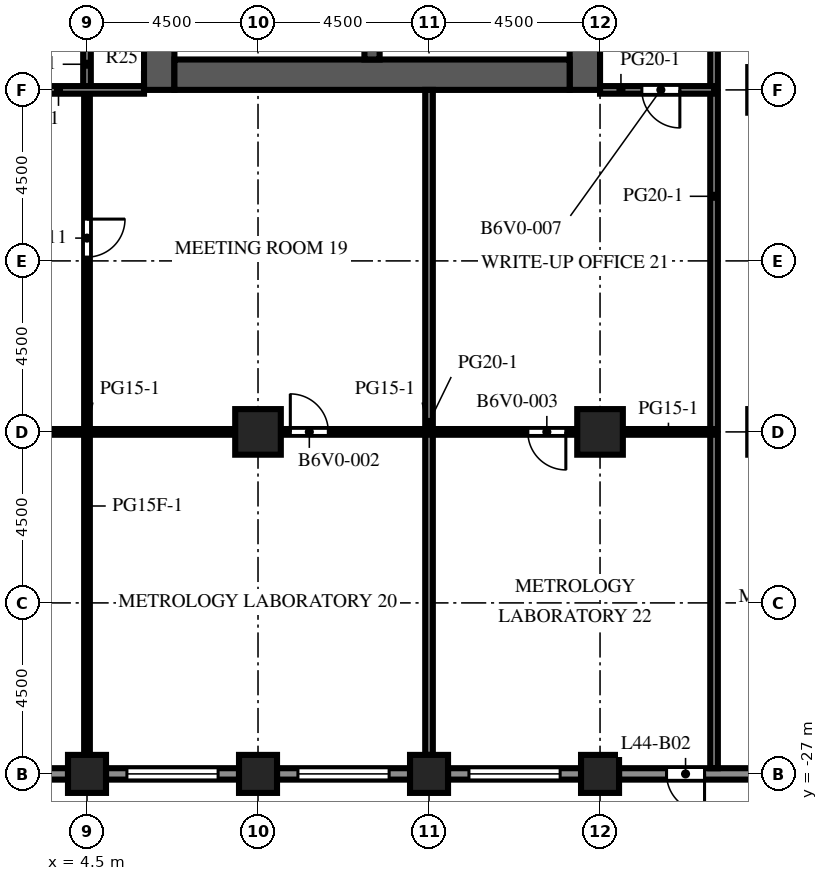
"""IFC4 building model, lengths in metres.
Left out: names, types, materials, properties, quantities, classifications, styles, units other than length and angle.
Written with IfcOpenShell. Run it as: python <this file> out.ifc"""

import sys

from ifc_helpers import new_model, si_unit, direction, frame, frame_2d, origin, origin_2d, place, context, subcontext, project, spatial, rectangle, extrude, element, fill, save


model = new_model("IFC4")
c1 = context("Model", 3, precision=1e-05, world=origin(), true_north=direction((0.0, 1.0)))
c2 = subcontext(c1, "Body", "Model", "MODEL_VIEW")
j1 = project(units=[si_unit("LENGTHUNIT", "METRE"), si_unit("PLANEANGLEUNIT", "RADIAN")], contexts=[c1])
p1 = place(None, origin())
s1 = spatial("IfcSite", under=j1, at=p1, CompositionType="ELEMENT")
p2 = place(p1, origin())
s2 = spatial("IfcBuilding", under=s1, at=p2, CompositionType="ELEMENT")
p3 = place(p2, frame((0.0, 0.0, 195.6)))
s3 = spatial("IfcBuildingStorey", under=s2, at=p3, CompositionType="ELEMENT", Elevation=195.6)
for number, where, z_axis, x_axis in (
    (1, (4.5, -27.0, 0.0), (0.0, 0.0, 1.0), (1.0, 0.0, 0.0)),
    (2, (9.0, -27.0, 0.0), (0.0, 0.0, 1.0), (1.0, 0.0, 0.0)),
    (3, (13.5, -27.0, 0.0), (0.0, 0.0, 1.0), (1.0, 0.0, 0.0)),
    (4, (18.0, -27.0, 0.0), (0.0, 0.0, 1.0), (1.0, 0.0, 0.0)),
):
    element("IfcColumn", number, at=place(p3, frame(where, z_axis=z_axis, x_axis=x_axis)), inside=s3, PredefinedType="COLUMN", context=c2, shape_type="SweptSolid", body=[
        extrude(rectangle(XDim=1.0, YDim=1.0, at=origin_2d()), origin(), (0.0, 0.0, 1.0), 4.1),
    ])
for number, where, z_axis, x_axis in (
    (5, (9.0, -18.0, 0.0), (0.0, 0.0, 1.0), (1.0, 0.0, 0.0)),
    (6, (18.0, -18.0, 0.0), (0.0, 0.0, 1.0), (1.0, 0.0, 0.0)),
):
    element("IfcColumn", number, at=place(p3, frame(where, z_axis=z_axis, x_axis=x_axis)), inside=s3, PredefinedType="COLUMN", context=c2, shape_type="SweptSolid", body=[
        extrude(rectangle(XDim=1.2, YDim=1.2, at=origin_2d()), origin(), (0.0, 0.0, 1.0), 4.1),
    ])
p4 = place(p3, frame((6.4, -9.0, 0.0), z_axis=(0.0, 0.0, 1.0), x_axis=(0.0, 1.0, 0.0)))
e7 = element("IfcWall", 7, at=p4, inside=s3, PredefinedType="SHEAR", context=c2, shape_type="SweptSolid", body=[
    extrude(rectangle(XDim=27.5, YDim=0.8, at=frame_2d((13.75, 0.0))), origin(), (0.0, 0.0, 1.0), 4.1),
])
p5 = place(p4, frame((12.55, 0.0, 0.0)))
e8 = element("IfcOpeningElement", 8, at=p5, cuts=e7, PredefinedType="OPENING", context=c2, shape_type="SweptSolid", body=[
    extrude(rectangle(XDim=2.4, YDim=2.4, at=frame_2d((1.2, 1.2))), frame((0.0, 0.41, 0.0), z_axis=(0.0, -1.0, 0.0), x_axis=(1.0, 0.0, 0.0)), (0.0, 0.0, 1.0), 0.82),
])
p6 = place(p4, frame((3.95, 0.0, 0.0)))
e9 = element("IfcOpeningElement", 9, at=p6, cuts=e7, PredefinedType="OPENING", context=c2, shape_type="SweptSolid", body=[
    extrude(rectangle(XDim=1.2, YDim=2.1, at=frame_2d((0.6, 1.05))), frame((0.0, 0.41, 0.0), z_axis=(0.0, -1.0, 0.0), x_axis=(1.0, 0.0, 0.0)), (0.0, 0.0, 1.0), 0.82),
])
p7 = place(p4, frame((19.45, 0.0, 0.0)))
e10 = element("IfcOpeningElement", 10, at=p7, cuts=e7, PredefinedType="OPENING", context=c2, shape_type="SweptSolid", body=[
    extrude(rectangle(XDim=1.0, YDim=2.1, at=frame_2d((0.5, 1.05))), frame((0.0, 0.41, 0.0), z_axis=(0.0, -1.0, 0.0), x_axis=(1.0, 0.0, 0.0)), (0.0, 0.0, 1.0), 0.82),
])
p8 = place(p4, frame((21.137, 0.0, 0.0)))
e11 = element("IfcOpeningElement", 11, at=p8, cuts=e7, PredefinedType="OPENING", context=c2, shape_type="SweptSolid", body=[
    extrude(rectangle(XDim=1.0, YDim=2.1, at=frame_2d((0.5, 1.05))), frame((0.0, 0.41, 0.0), z_axis=(0.0, -1.0, 0.0), x_axis=(1.0, 0.0, 0.0)), (0.0, 0.0, 1.0), 0.82),
])
p9 = place(p4, frame((23.2, 0.0, 0.0)))
e12 = element("IfcOpeningElement", 12, at=p9, cuts=e7, PredefinedType="OPENING", context=c2, shape_type="SweptSolid", body=[
    extrude(rectangle(XDim=1.0, YDim=2.1, at=frame_2d((0.5, 1.05))), frame((0.0, 0.41, 0.0), z_axis=(0.0, -1.0, 0.0), x_axis=(1.0, 0.0, 0.0)), (0.0, 0.0, 1.0), 0.82),
])
p10 = place(p4, frame((25.262, 0.0, 0.0)))
e13 = element("IfcOpeningElement", 13, at=p10, cuts=e7, PredefinedType="OPENING", context=c2, shape_type="SweptSolid", body=[
    extrude(rectangle(XDim=1.0, YDim=2.1, at=frame_2d((0.5, 1.05))), frame((0.0, 0.41, 0.0), z_axis=(0.0, -1.0, 0.0), x_axis=(1.0, 0.0, 0.0)), (0.0, 0.0, 1.0), 0.82),
])
p11 = place(p3, frame((17.6, -9.0, 0.0), z_axis=(0.0, 0.0, 1.0), x_axis=(0.0, 1.0, 0.0)))
e14 = element("IfcWall", 14, at=p11, inside=s3, PredefinedType="SHEAR", context=c2, shape_type="SweptSolid", body=[
    extrude(rectangle(XDim=27.5, YDim=0.8, at=frame_2d((13.75, 0.0))), origin(), (0.0, 0.0, 1.0), 4.1),
])
p12 = place(p11, frame((12.55, 0.0, 0.0)))
e15 = element("IfcOpeningElement", 15, at=p12, cuts=e14, PredefinedType="OPENING", context=c2, shape_type="SweptSolid", body=[
    extrude(rectangle(XDim=2.4, YDim=2.4, at=frame_2d((1.2, 1.2))), frame((0.0, 0.41, 0.0), z_axis=(0.0, -1.0, 0.0), x_axis=(1.0, 0.0, 0.0)), (0.0, 0.0, 1.0), 0.82),
])
p13 = place(p11, frame((6.825, 0.0, 0.0)))
e16 = element("IfcOpeningElement", 16, at=p13, cuts=e14, PredefinedType="OPENING", context=c2, shape_type="SweptSolid", body=[
    extrude(rectangle(XDim=1.2, YDim=2.1, at=frame_2d((0.6, 1.05))), frame((0.0, 0.41, 0.0), z_axis=(0.0, -1.0, 0.0), x_axis=(1.0, 0.0, 0.0)), (0.0, 0.0, 1.0), 0.82),
])
p14 = place(p11, frame((19.475, 0.0, 0.0)))
e17 = element("IfcOpeningElement", 17, at=p14, cuts=e14, PredefinedType="OPENING", context=c2, shape_type="SweptSolid", body=[
    extrude(rectangle(XDim=1.2, YDim=2.1, at=frame_2d((0.6, 1.05))), frame((0.0, 0.41, 0.0), z_axis=(0.0, -1.0, 0.0), x_axis=(1.0, 0.0, 0.0)), (0.0, 0.0, 1.0), 0.82),
])
p15 = place(p3, frame((6.8, -8.6, 0.0), z_axis=(0.0, 0.0, 1.0), x_axis=(1.0, 0.0, 0.0)))
e18 = element("IfcWall", 18, at=p15, inside=s3, PredefinedType="SHEAR", context=c2, shape_type="SweptSolid", body=[
    extrude(rectangle(XDim=10.4, YDim=0.8, at=frame_2d((5.2, 0.0))), origin(), (0.0, 0.0, 1.0), 4.1),
])
p16 = place(p3, frame((12.0, -8.2, 0.0), z_axis=(0.0, 0.0, 1.0), x_axis=(0.0, 1.0, 0.0)))
e19 = element("IfcWall", 19, at=p16, inside=s3, PredefinedType="SHEAR", context=c2, shape_type="SweptSolid", body=[
    extrude(rectangle(XDim=7.5, YDim=0.4, at=frame_2d((3.75, 0.0))), origin(), (0.0, 0.0, 1.0), 4.1),
])
p17 = place(p3, frame((4.0, -27.0, 0.0), z_axis=(0.0, 0.0, 1.0), x_axis=(-1.0, 0.0, 0.0)))
e20 = element("IfcWall", 20, at=p17, inside=s3, PredefinedType="SOLIDWALL", context=c2, shape_type="SweptSolid", body=[
    extrude(rectangle(XDim=3.5, YDim=0.3, at=frame_2d((1.75, 0.0))), origin(), (0.0, 0.0, 1.0), 2.85),
])
p18 = place(p17, frame((0.55, 0.0, 0.8)))
e21 = element("IfcOpeningElement", 21, at=p18, cuts=e20, PredefinedType="OPENING", context=c2, shape_type="SweptSolid", body=[
    extrude(rectangle(XDim=2.4, YDim=1.7, at=frame_2d((1.2, 0.85))), frame((0.0, 0.16, 0.0), z_axis=(0.0, -1.0, 0.0), x_axis=(1.0, 0.0, 0.0)), (0.0, 0.0, 1.0), 0.32),
])
p19 = place(p3, frame((8.5, -27.0, 0.0), z_axis=(0.0, 0.0, 1.0), x_axis=(-1.0, 0.0, 0.0)))
e22 = element("IfcWall", 22, at=p19, inside=s3, PredefinedType="SOLIDWALL", context=c2, shape_type="SweptSolid", body=[
    extrude(rectangle(XDim=3.5, YDim=0.3, at=frame_2d((1.75, 0.0))), origin(), (0.0, 0.0, 1.0), 2.85),
])
p20 = place(p19, frame((0.55, 0.0, 0.8)))
e23 = element("IfcOpeningElement", 23, at=p20, cuts=e22, PredefinedType="OPENING", context=c2, shape_type="SweptSolid", body=[
    extrude(rectangle(XDim=2.4, YDim=1.7, at=frame_2d((1.2, 0.85))), frame((0.0, 0.16, 0.0), z_axis=(0.0, -1.0, 0.0), x_axis=(1.0, 0.0, 0.0)), (0.0, 0.0, 1.0), 0.32),
])
p21 = place(p3, frame((13.0, -27.0, 0.0), z_axis=(0.0, 0.0, 1.0), x_axis=(-1.0, 0.0, 0.0)))
e24 = element("IfcWall", 24, at=p21, inside=s3, PredefinedType="SOLIDWALL", context=c2, shape_type="SweptSolid", body=[
    extrude(rectangle(XDim=3.5, YDim=0.3, at=frame_2d((1.75, 0.0))), origin(), (0.0, 0.0, 1.0), 2.85),
])
p22 = place(p21, frame((0.55, 0.0, 0.8)))
e25 = element("IfcOpeningElement", 25, at=p22, cuts=e24, PredefinedType="OPENING", context=c2, shape_type="SweptSolid", body=[
    extrude(rectangle(XDim=2.4, YDim=1.7, at=frame_2d((1.2, 0.85))), frame((0.0, 0.16, 0.0), z_axis=(0.0, -1.0, 0.0), x_axis=(1.0, 0.0, 0.0)), (0.0, 0.0, 1.0), 0.32),
])
p23 = place(p3, frame((17.5, -27.0, 0.0), z_axis=(0.0, 0.0, 1.0), x_axis=(-1.0, 0.0, 0.0)))
e26 = element("IfcWall", 26, at=p23, inside=s3, PredefinedType="SOLIDWALL", context=c2, shape_type="SweptSolid", body=[
    extrude(rectangle(XDim=3.5, YDim=0.3, at=frame_2d((1.75, 0.0))), origin(), (0.0, 0.0, 1.0), 2.85),
])
p24 = place(p23, frame((0.55, 0.0, 0.8)))
e27 = element("IfcOpeningElement", 27, at=p24, cuts=e26, PredefinedType="OPENING", context=c2, shape_type="SweptSolid", body=[
    extrude(rectangle(XDim=2.4, YDim=1.7, at=frame_2d((1.2, 0.85))), frame((0.0, 0.16, 0.0), z_axis=(0.0, -1.0, 0.0), x_axis=(1.0, 0.0, 0.0)), (0.0, 0.0, 1.0), 0.32),
])
p25 = place(p3, frame((22.0, -27.0, 0.0), z_axis=(0.0, 0.0, 1.0), x_axis=(-1.0, 0.0, 0.0)))
e28 = element("IfcWall", 28, at=p25, inside=s3, PredefinedType="SOLIDWALL", context=c2, shape_type="SweptSolid", body=[
    extrude(rectangle(XDim=3.5, YDim=0.3, at=frame_2d((1.75, 0.0))), origin(), (0.0, 0.0, 1.0), 2.85),
])
p26 = place(p25, frame((1.25, 0.0, 0.0)))
e29 = element("IfcOpeningElement", 29, at=p26, cuts=e28, PredefinedType="OPENING", context=c2, shape_type="SweptSolid", body=[
    extrude(rectangle(XDim=1.0, YDim=2.2, at=frame_2d((0.5, 1.1))), frame((0.0, 0.16, 0.0), z_axis=(0.0, -1.0, 0.0), x_axis=(1.0, 0.0, 0.0)), (0.0, 0.0, 1.0), 0.32),
])
p27 = place(p3, frame((4.5, -9.0, 0.0), z_axis=(0.0, 0.0, 1.0), x_axis=(0.0, -1.0, 0.0)))
e30 = element("IfcWall", 30, at=p27, inside=s3, PredefinedType="PARTITIONING", context=c2, shape_type="SweptSolid", body=[
    extrude(rectangle(XDim=17.5, YDim=0.15, at=frame_2d((8.75, 0.0))), origin(), (0.0, 0.0, 1.0), 3.65),
])
p28 = place(p27, frame((3.4, 0.0, 0.0)))
e31 = element("IfcOpeningElement", 31, at=p28, cuts=e30, PredefinedType="OPENING", context=c2, shape_type="SweptSolid", body=[
    extrude(rectangle(XDim=1.0, YDim=2.1, at=frame_2d((0.5, 1.05))), frame((0.0, 0.085, 0.0), z_axis=(0.0, -1.0, 0.0), x_axis=(1.0, 0.0, 0.0)), (0.0, 0.0, 1.0), 0.17),
])
p29 = place(p3, frame((4.5, -6.0, 0.0), z_axis=(0.0, 0.0, 1.0), x_axis=(0.0, -1.0, 0.0)))
e32 = element("IfcWall", 32, at=p29, inside=s3, PredefinedType="PARTITIONING", context=c2, shape_type="SweptSolid", body=[
    extrude(rectangle(XDim=3.0, YDim=0.2, at=frame_2d((1.5, 0.0))), origin(), (0.0, 0.0, 1.0), 3.65),
])
p30 = place(p29, frame((0.65, 0.0, 0.0)))
e33 = element("IfcOpeningElement", 33, at=p30, cuts=e32, PredefinedType="OPENING", context=c2, shape_type="SweptSolid", body=[
    extrude(rectangle(XDim=1.0, YDim=2.1, at=frame_2d((0.5, 1.05))), frame((0.0, 0.11, 0.0), z_axis=(0.0, -1.0, 0.0), x_axis=(1.0, 0.0, 0.0)), (0.0, 0.0, 1.0), 0.22),
])
p31 = place(p3, frame((13.5, -26.5, 0.0), z_axis=(0.0, 0.0, 1.0), x_axis=(0.0, 1.0, 0.0)))
e34 = element("IfcWall", 34, at=p31, inside=s3, PredefinedType="PARTITIONING", context=c2, shape_type="SweptSolid", body=[
    extrude(rectangle(XDim=17.5, YDim=0.2, at=frame_2d((8.75, 0.0))), origin(), (0.0, 0.0, 1.0), 3.65),
])
p32 = place(p3, frame((21.0, -26.85, 0.0), z_axis=(0.0, 0.0, 1.0), x_axis=(0.0, 1.0, 0.0)))
e35 = element("IfcWall", 35, at=p32, inside=s3, PredefinedType="PARTITIONING", context=c2, shape_type="SweptSolid", body=[
    extrude(rectangle(XDim=30.1, YDim=0.2, at=frame_2d((15.05, 0.0))), origin(), (0.0, 0.0, 1.0), 3.65),
])
p33 = place(p3, frame((0.6, -18.0, 0.0), z_axis=(0.0, 0.0, 1.0), x_axis=(1.0, 0.0, 0.0)))
e36 = element("IfcWall", 36, at=p33, inside=s3, PredefinedType="PARTITIONING", context=c2, shape_type="SweptSolid", body=[
    extrude(rectangle(XDim=7.8, YDim=0.15, at=frame_2d((3.9, 0.0))), origin(), (0.0, 0.0, 1.0), 3.65),
])
p34 = place(p3, frame((17.4, -18.0, 0.0), z_axis=(0.0, 0.0, 1.0), x_axis=(-1.0, 0.0, 0.0)))
e37 = element("IfcWall", 37, at=p34, inside=s3, PredefinedType="PARTITIONING", context=c2, shape_type="SweptSolid", body=[
    extrude(rectangle(XDim=7.8, YDim=0.15, at=frame_2d((3.9, 0.0))), origin(), (0.0, 0.0, 1.0), 3.65),
])
p35 = place(p34, frame((6.55, 0.0, 0.0)))
e38 = element("IfcOpeningElement", 38, at=p35, cuts=e37, PredefinedType="OPENING", context=c2, shape_type="SweptSolid", body=[
    extrude(rectangle(XDim=1.0, YDim=2.1, at=frame_2d((0.5, 1.05))), frame((0.0, 0.085, 0.0), z_axis=(0.0, -1.0, 0.0), x_axis=(1.0, 0.0, 0.0)), (0.0, 0.0, 1.0), 0.17),
])
p36 = place(p34, frame((0.3, 0.0, 0.0)))
e39 = element("IfcOpeningElement", 39, at=p36, cuts=e37, PredefinedType="OPENING", context=c2, shape_type="SweptSolid", body=[
    extrude(rectangle(XDim=1.0, YDim=2.1, at=frame_2d((0.5, 1.05))), frame((0.0, 0.085, 0.0), z_axis=(0.0, -1.0, 0.0), x_axis=(1.0, 0.0, 0.0)), (0.0, 0.0, 1.0), 0.17),
])
p37 = place(p3, frame((18.6, -18.0, 0.0), z_axis=(0.0, 0.0, 1.0), x_axis=(1.0, 0.0, 0.0)))
e40 = element("IfcWall", 40, at=p37, inside=s3, PredefinedType="PARTITIONING", context=c2, shape_type="SweptSolid", body=[
    extrude(rectangle(XDim=2.4, YDim=0.15, at=frame_2d((1.2, 0.0))), origin(), (0.0, 0.0, 1.0), 3.65),
])
p38 = place(p3, frame((1.5, -9.0, 0.0), z_axis=(0.0, 0.0, 1.0), x_axis=(1.0, 0.0, 0.0)))
e41 = element("IfcWall", 41, at=p38, inside=s3, PredefinedType="PARTITIONING", context=c2, shape_type="SweptSolid", body=[
    extrude(rectangle(XDim=4.5, YDim=0.2, at=frame_2d((2.25, 0.0))), origin(), (0.0, 0.0, 1.0), 3.65),
])
p39 = place(p3, frame((21.0, -9.0, 0.0), z_axis=(0.0, 0.0, 1.0), x_axis=(-1.0, 0.0, 0.0)))
e42 = element("IfcWall", 42, at=p39, inside=s3, PredefinedType="PARTITIONING", context=c2, shape_type="SweptSolid", body=[
    extrude(rectangle(XDim=3.0, YDim=0.2, at=frame_2d((1.5, 0.0))), origin(), (0.0, 0.0, 1.0), 3.65),
])
p40 = place(p39, frame((0.9, 0.0, 0.0)))
e43 = element("IfcOpeningElement", 43, at=p40, cuts=e42, PredefinedType="OPENING", context=c2, shape_type="SweptSolid", body=[
    extrude(rectangle(XDim=1.0, YDim=2.1, at=frame_2d((0.5, 1.05))), frame((0.0, 0.11, 0.0), z_axis=(0.0, -1.0, 0.0), x_axis=(1.0, 0.0, 0.0)), (0.0, 0.0, 1.0), 0.22),
])
p41 = place(p20, origin())
e44 = element("IfcWindow", 44, at=p41, inside=s3, PartitioningType="SINGLE_PANEL", PredefinedType="WINDOW", context=c2, shape_type="SweptSolid", body=[
    extrude(rectangle(XDim=2.4, YDim=1.7, at=frame_2d((1.2, 0.85))), frame((0.0, 0.03, 0.0), z_axis=(0.0, -1.0, 0.0), x_axis=(1.0, 0.0, 0.0)), (0.0, 0.0, 1.0), 0.06),
])
fill(e23, e44)
p42 = place(p22, origin())
e45 = element("IfcWindow", 45, at=p42, inside=s3, PartitioningType="SINGLE_PANEL", PredefinedType="WINDOW", context=c2, shape_type="SweptSolid", body=[
    extrude(rectangle(XDim=2.4, YDim=1.7, at=frame_2d((1.2, 0.85))), frame((0.0, 0.03, 0.0), z_axis=(0.0, -1.0, 0.0), x_axis=(1.0, 0.0, 0.0)), (0.0, 0.0, 1.0), 0.06),
])
fill(e25, e45)
p43 = place(p24, origin())
e46 = element("IfcWindow", 46, at=p43, inside=s3, PartitioningType="SINGLE_PANEL", PredefinedType="WINDOW", context=c2, shape_type="SweptSolid", body=[
    extrude(rectangle(XDim=2.4, YDim=1.7, at=frame_2d((1.2, 0.85))), frame((0.0, 0.03, 0.0), z_axis=(0.0, -1.0, 0.0), x_axis=(1.0, 0.0, 0.0)), (0.0, 0.0, 1.0), 0.06),
])
fill(e27, e46)
p44 = place(p26, origin())
e47 = element("IfcDoor", 47, at=p44, inside=s3, OperationType="SINGLE_SWING_LEFT", PredefinedType="DOOR", context=c2, shape_type="SweptSolid", body=[
    extrude(rectangle(XDim=1.0, YDim=2.2, at=frame_2d((0.5, 1.1))), frame((0.0, 0.025, 0.0), z_axis=(0.0, -1.0, 0.0), x_axis=(1.0, 0.0, 0.0)), (0.0, 0.0, 1.0), 0.05),
])
fill(e29, e47)
p45 = place(p35, origin())
e48 = element("IfcDoor", 48, at=p45, inside=s3, OperationType="SINGLE_SWING_RIGHT", PredefinedType="DOOR", context=c2, shape_type="SweptSolid", body=[
    extrude(rectangle(XDim=1.0, YDim=2.1, at=frame_2d((0.5, 1.05))), frame((0.0, 0.025, 0.0), z_axis=(0.0, -1.0, 0.0), x_axis=(1.0, 0.0, 0.0)), (0.0, 0.0, 1.0), 0.05),
])
fill(e38, e48)
p46 = place(p36, origin())
e49 = element("IfcDoor", 49, at=p46, inside=s3, OperationType="SINGLE_SWING_LEFT", PredefinedType="DOOR", context=c2, shape_type="SweptSolid", body=[
    extrude(rectangle(XDim=1.0, YDim=2.1, at=frame_2d((0.5, 1.05))), frame((0.0, 0.025, 0.0), z_axis=(0.0, -1.0, 0.0), x_axis=(1.0, 0.0, 0.0)), (0.0, 0.0, 1.0), 0.05),
])
fill(e39, e49)
p47 = place(p40, origin())
e50 = element("IfcDoor", 50, at=p47, inside=s3, OperationType="SINGLE_SWING_LEFT", PredefinedType="DOOR", context=c2, shape_type="SweptSolid", body=[
    extrude(rectangle(XDim=1.0, YDim=2.1, at=frame_2d((0.5, 1.05))), frame((0.0, 0.025, 0.0), z_axis=(0.0, -1.0, 0.0), x_axis=(1.0, 0.0, 0.0)), (0.0, 0.0, 1.0), 0.05),
])
fill(e43, e50)
p48 = place(p28, origin())
e51 = element("IfcDoor", 51, at=p48, inside=s3, OperationType="SINGLE_SWING_LEFT", PredefinedType="DOOR", context=c2, shape_type="SweptSolid", body=[
    extrude(rectangle(XDim=1.0, YDim=2.1, at=frame_2d((0.5, 1.05))), frame((0.0, 0.025, 0.0), z_axis=(0.0, -1.0, 0.0), x_axis=(1.0, 0.0, 0.0)), (0.0, 0.0, 1.0), 0.05),
])
fill(e31, e51)
save(model, sys.argv[1])
